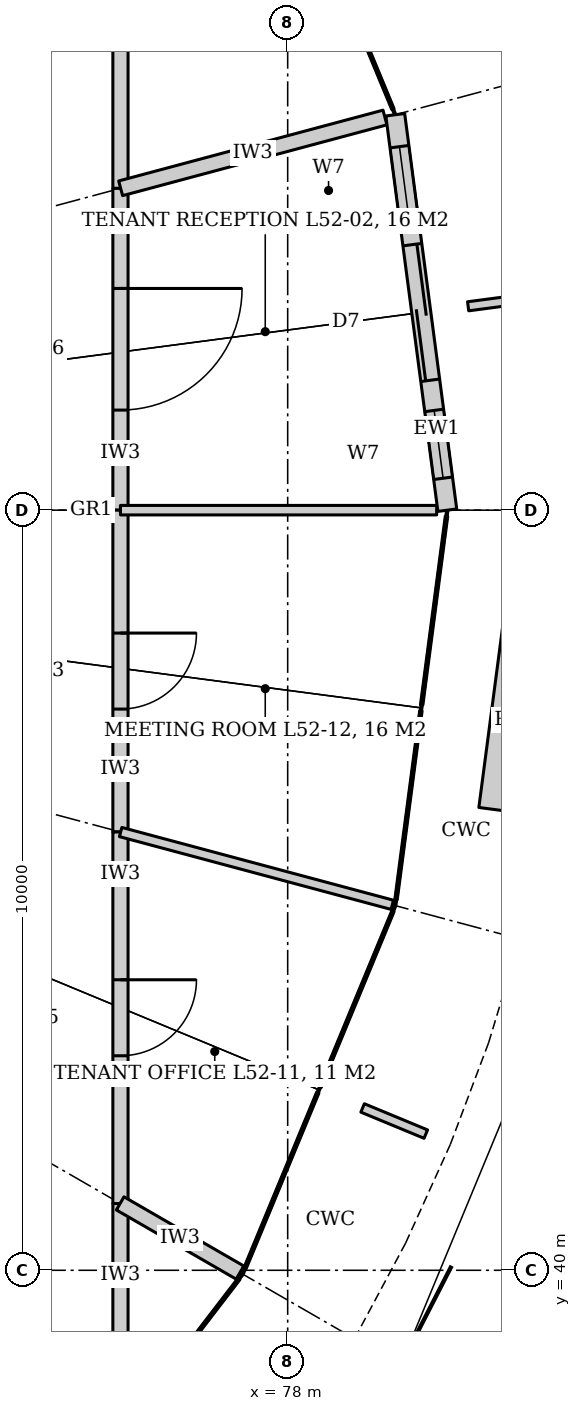
"""IFC4 building model, lengths in metres.
Left out: names, types, materials, properties, quantities, classifications, styles, units other than length and angle.
Written with IfcOpenShell. Run it as: python <this file> out.ifc"""

import sys

from ifc_helpers import new_model, si_unit, direction, frame, frame_2d, origin, place, context, subcontext, project, spatial, rectangle, extrude, element, fill, save


model = new_model("IFC4")
c1 = context("Model", 3, precision=1e-05, world=origin(), true_north=direction((0.0, 1.0)))
c2 = subcontext(c1, "Body", "Model", "MODEL_VIEW")
j1 = project(units=[si_unit("LENGTHUNIT", "METRE"), si_unit("PLANEANGLEUNIT", "RADIAN")], contexts=[c1])
p1 = place(None, origin())
s1 = spatial("IfcSite", under=j1, at=p1, CompositionType="ELEMENT")
p2 = place(p1, origin())
s2 = spatial("IfcBuilding", under=s1, at=p2, CompositionType="ELEMENT")
p3 = place(p2, frame((0.0, 0.0, 227.6)))
s3 = spatial("IfcBuildingStorey", under=s2, at=p3, CompositionType="ELEMENT", Elevation=227.6)
p4 = place(p3, frame((75.8, 58.8, 0.0), z_axis=(0.0, 0.0, 1.0), x_axis=(0.0, -1.0, 0.0)))
e1 = element("IfcWall", 1, at=p4, inside=s3, PredefinedType="PARTITIONING", context=c2, shape_type="SweptSolid", body=[
    extrude(rectangle(XDim=4.566, YDim=0.2, at=frame_2d((2.283, 0.0))), origin(), (0.0, 0.0, 1.0), 3.02),
])
p5 = place(p3, frame((75.8, 54.234, 0.0), z_axis=(0.0, 0.0, 1.0), x_axis=(0.0, -1.0, 0.0)))
e2 = element("IfcWall", 2, at=p5, inside=s3, PredefinedType="PARTITIONING", context=c2, shape_type="SweptSolid", body=[
    extrude(rectangle(XDim=4.234, YDim=0.2, at=frame_2d((2.117, 0.0))), origin(), (0.0, 0.0, 1.0), 3.02),
])
p6 = place(p5, frame((1.317, 0.0, 0.0)))
e3 = element("IfcOpeningElement", 3, at=p6, cuts=e2, PredefinedType="OPENING", context=c2, shape_type="SweptSolid", body=[
    extrude(rectangle(XDim=1.6, YDim=2.4, at=frame_2d((0.8, 1.2))), frame((0.0, 0.11, 0.0), z_axis=(0.0, -1.0, 0.0), x_axis=(1.0, 0.0, 0.0)), (0.0, 0.0, 1.0), 0.22),
])
p7 = place(p3, frame((75.8, 50.0, 0.0), z_axis=(0.0, 0.0, 1.0), x_axis=(0.0, -1.0, 0.0)))
e4 = element("IfcWall", 4, at=p7, inside=s3, PredefinedType="PARTITIONING", context=c2, shape_type="SweptSolid", body=[
    extrude(rectangle(XDim=4.234, YDim=0.2, at=frame_2d((2.117, 0.0))), origin(), (0.0, 0.0, 1.0), 3.02),
])
p8 = place(p7, frame((1.617, 0.0, 0.0)))
e5 = element("IfcOpeningElement", 5, at=p8, cuts=e4, PredefinedType="OPENING", context=c2, shape_type="SweptSolid", body=[
    extrude(rectangle(XDim=1.0, YDim=2.4, at=frame_2d((0.5, 1.2))), frame((0.0, 0.11, 0.0), z_axis=(0.0, -1.0, 0.0), x_axis=(1.0, 0.0, 0.0)), (0.0, 0.0, 1.0), 0.22),
])
p9 = place(p3, frame((75.8, 45.766, 0.0), z_axis=(0.0, 0.0, 1.0), x_axis=(0.0, -1.0, 0.0)))
e6 = element("IfcWall", 6, at=p9, inside=s3, PredefinedType="PARTITIONING", context=c2, shape_type="SweptSolid", body=[
    extrude(rectangle(XDim=4.888, YDim=0.2, at=frame_2d((2.444, 0.0))), origin(), (0.0, 0.0, 1.0), 3.02),
])
p10 = place(p9, frame((1.944, 0.0, 0.0)))
e7 = element("IfcOpeningElement", 7, at=p10, cuts=e6, PredefinedType="OPENING", context=c2, shape_type="SweptSolid", body=[
    extrude(rectangle(XDim=1.0, YDim=2.1, at=frame_2d((0.5, 1.05))), frame((0.0, 0.11, 0.0), z_axis=(0.0, -1.0, 0.0), x_axis=(1.0, 0.0, 0.0)), (0.0, 0.0, 1.0), 0.22),
])
p11 = place(p3, frame((75.8, 40.878, 0.0), z_axis=(0.0, 0.0, 1.0), x_axis=(0.0, -1.0, 0.0)))
e8 = element("IfcWall", 8, at=p11, inside=s3, PredefinedType="PARTITIONING", context=c2, shape_type="SweptSolid", body=[
    extrude(rectangle(XDim=1.878, YDim=0.2, at=frame_2d((0.939, 0.0))), origin(), (0.0, 0.0, 1.0), 3.02),
])
p12 = place(p3, frame((75.8, 50.0, 0.0), z_axis=(0.0, 0.0, 1.0), x_axis=(1.0, 0.0, 0.0)))
e9 = element("IfcWall", 9, at=p12, inside=s3, PredefinedType="PARTITIONING", context=c2, shape_type="SweptSolid", body=[
    extrude(rectangle(XDim=4.16, YDim=0.125, at=frame_2d((2.08, 0.0))), origin(), (0.0, 0.0, 1.0), 3.02),
])
p13 = place(p3, frame((75.802, 54.234, 0.0), z_axis=(0.0, 0.0, 1.0), x_axis=(0.96593261366, 0.258793712962, 0.0)))
e10 = element("IfcWall", 10, at=p13, inside=s3, PredefinedType="PARTITIONING", context=c2, shape_type="SweptSolid", body=[
    extrude(rectangle(XDim=3.6, YDim=0.2, at=frame_2d((1.8, 0.0))), origin(), (0.0, 0.0, 1.0), 3.02),
])
p14 = place(p3, frame((75.796, 40.88, 0.0), z_axis=(0.0, 0.0, 1.0), x_axis=(0.866047089031, -0.499962438169, 0.0)))
e11 = element("IfcWall", 11, at=p14, inside=s3, PredefinedType="PARTITIONING", context=c2, shape_type="SweptSolid", body=[
    extrude(rectangle(XDim=1.82, YDim=0.2, at=frame_2d((0.91, 0.0))), origin(), (0.0, 0.0, 1.0), 3.02),
])
p15 = place(p3, frame((75.802, 45.766, 0.0), z_axis=(0.0, 0.0, 1.0), x_axis=(0.965934209463, -0.258787756644, 0.0)))
e12 = element("IfcWall", 12, at=p15, inside=s3, PredefinedType="PARTITIONING", context=c2, shape_type="SweptSolid", body=[
    extrude(rectangle(XDim=3.7, YDim=0.125, at=frame_2d((1.85, 0.0))), origin(), (0.0, 0.0, 1.0), 3.02),
])
p16 = place(p3, frame((80.1, 50.0, 0.0), z_axis=(0.0, 0.0, 1.0), x_axis=(-0.130560429487, 0.991440353351, 0.0)))
e13 = element("IfcWall", 13, at=p16, inside=s3, PredefinedType="SOLIDWALL", context=c2, shape_type="SweptSolid", body=[
    extrude(rectangle(XDim=5.247, YDim=0.25, at=frame_2d((2.624, 0.0))), origin(), (0.0, 0.0, 1.0), 4.04),
])
p17 = place(p16, frame((1.724, 0.0, 0.0)))
e14 = element("IfcOpeningElement", 14, at=p17, cuts=e13, PredefinedType="OPENING", context=c2, shape_type="SweptSolid", body=[
    extrude(rectangle(XDim=1.8, YDim=2.4, at=frame_2d((0.9, 1.2))), frame((0.0, 0.135, 0.0), z_axis=(0.0, -1.0, 0.0), x_axis=(1.0, 0.0, 0.0)), (0.0, 0.0, 1.0), 0.27),
])
p18 = place(p16, frame((0.424, 0.0, 0.0)))
e15 = element("IfcOpeningElement", 15, at=p18, cuts=e13, PredefinedType="OPENING", context=c2, shape_type="SweptSolid", body=[
    extrude(rectangle(XDim=0.9, YDim=2.4, at=frame_2d((0.45, 1.2))), frame((0.0, 0.135, 0.0), z_axis=(0.0, -1.0, 0.0), x_axis=(1.0, 0.0, 0.0)), (0.0, 0.0, 1.0), 0.27),
])
p19 = place(p16, frame((3.924, 0.0, 0.0)))
e16 = element("IfcOpeningElement", 16, at=p19, cuts=e13, PredefinedType="OPENING", context=c2, shape_type="SweptSolid", body=[
    extrude(rectangle(XDim=0.9, YDim=2.4, at=frame_2d((0.45, 1.2))), frame((0.0, 0.135, 0.0), z_axis=(0.0, -1.0, 0.0), x_axis=(1.0, 0.0, 0.0)), (0.0, 0.0, 1.0), 0.27),
])
p20 = place(p6, origin())
e17 = element("IfcDoor", 17, at=p20, inside=s3, OperationType="DOUBLE_DOOR_DOUBLE_SWING", PredefinedType="DOOR", context=c2, shape_type="SweptSolid", body=[
    extrude(rectangle(XDim=1.6, YDim=2.4, at=frame_2d((0.8, 1.2))), frame((0.0, 0.025, 0.0), z_axis=(0.0, -1.0, 0.0), x_axis=(1.0, 0.0, 0.0)), (0.0, 0.0, 1.0), 0.05),
])
fill(e3, e17)
p21 = place(p10, origin())
e18 = element("IfcDoor", 18, at=p21, inside=s3, OperationType="SINGLE_SWING_LEFT", PredefinedType="DOOR", context=c2, shape_type="SweptSolid", body=[
    extrude(rectangle(XDim=1.0, YDim=2.1, at=frame_2d((0.5, 1.05))), frame((0.0, 0.025, 0.0), z_axis=(0.0, -1.0, 0.0), x_axis=(1.0, 0.0, 0.0)), (0.0, 0.0, 1.0), 0.05),
])
fill(e7, e18)
p22 = place(p8, origin())
e19 = element("IfcDoor", 19, at=p22, inside=s3, OperationType="SINGLE_SWING_LEFT", PredefinedType="DOOR", context=c2, shape_type="SweptSolid", body=[
    extrude(rectangle(XDim=1.0, YDim=2.4, at=frame_2d((0.5, 1.2))), frame((0.0, 0.025, 0.0), z_axis=(0.0, -1.0, 0.0), x_axis=(1.0, 0.0, 0.0)), (0.0, 0.0, 1.0), 0.05),
])
fill(e5, e19)
p23 = place(p17, origin())
e20 = element("IfcDoor", 20, at=p23, inside=s3, OperationType="DOUBLE_DOOR_SLIDING", PredefinedType="DOOR", context=c2, shape_type="SweptSolid", body=[
    extrude(rectangle(XDim=1.8, YDim=2.4, at=frame_2d((0.9, 1.2))), frame((0.0, 0.025, 0.0), z_axis=(0.0, -1.0, 0.0), x_axis=(1.0, 0.0, 0.0)), (0.0, 0.0, 1.0), 0.05),
])
fill(e14, e20)
p24 = place(p18, origin())
e21 = element("IfcWindow", 21, at=p24, inside=s3, PartitioningType="SINGLE_PANEL", PredefinedType="WINDOW", context=c2, shape_type="SweptSolid", body=[
    extrude(rectangle(XDim=0.9, YDim=2.4, at=frame_2d((0.45, 1.2))), frame((0.0, 0.03, 0.0), z_axis=(0.0, -1.0, 0.0), x_axis=(1.0, 0.0, 0.0)), (0.0, 0.0, 1.0), 0.06),
])
fill(e15, e21)
p25 = place(p19, origin())
e22 = element("IfcWindow", 22, at=p25, inside=s3, PartitioningType="SINGLE_PANEL", PredefinedType="WINDOW", context=c2, shape_type="SweptSolid", body=[
    extrude(rectangle(XDim=0.9, YDim=2.4, at=frame_2d((0.45, 1.2))), frame((0.0, 0.03, 0.0), z_axis=(0.0, -1.0, 0.0), x_axis=(1.0, 0.0, 0.0)), (0.0, 0.0, 1.0), 0.06),
])
fill(e16, e22)
save(model, sys.argv[1])
